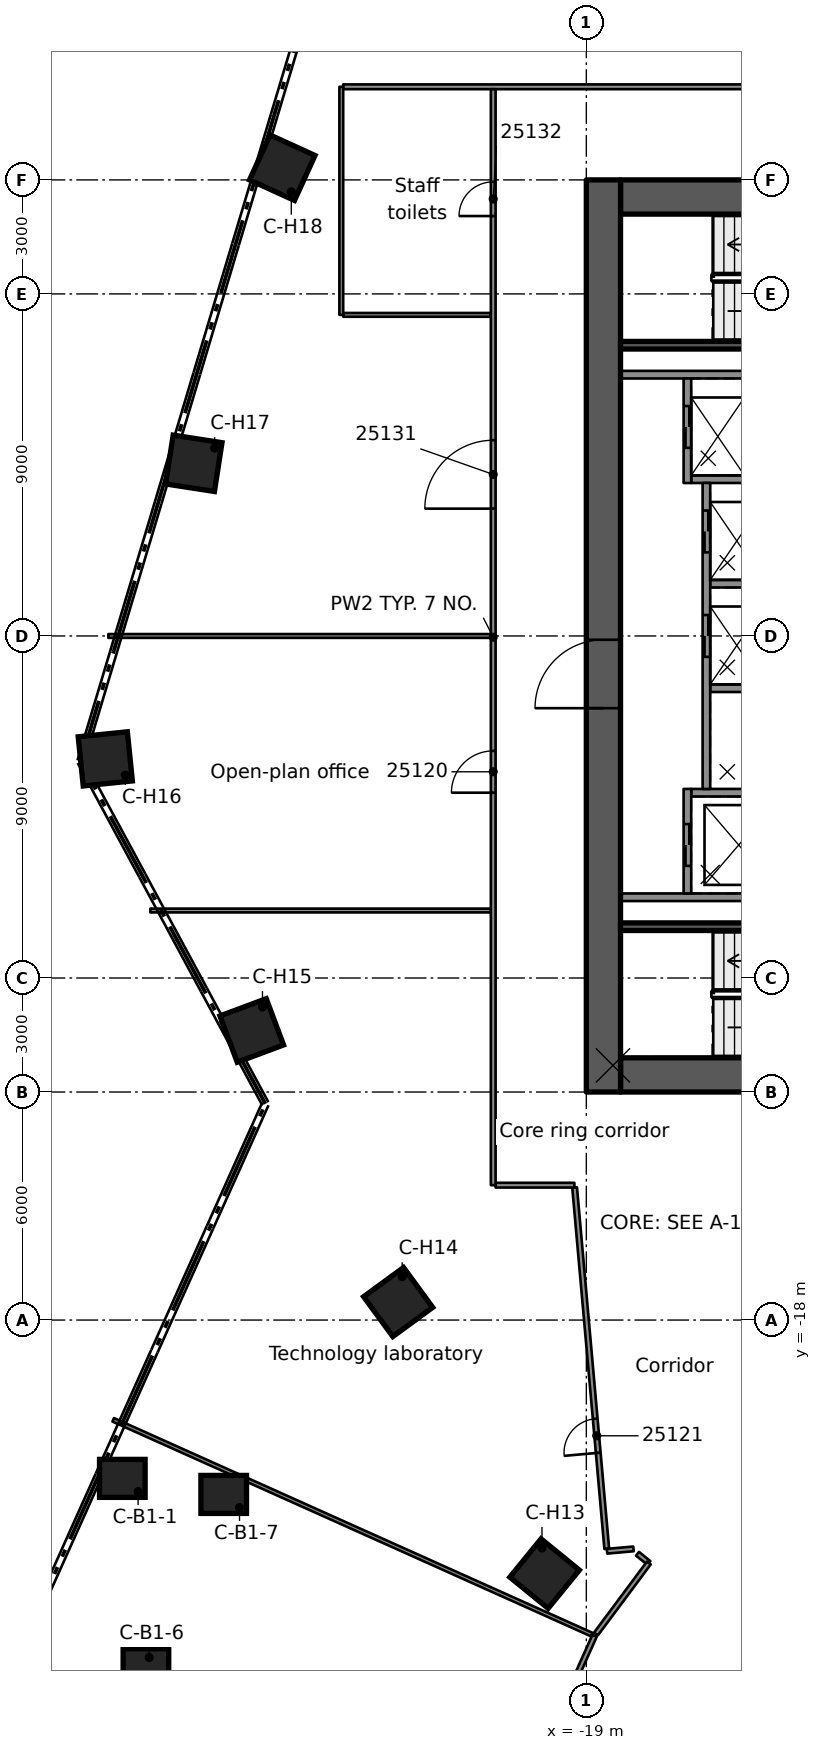
"""IFC4 building model, lengths in metres.
Left out: names, types, materials, properties, quantities, classifications, styles, units other than length and angle.
Written with IfcOpenShell. Run it as: python <this file> out.ifc"""

import sys

from ifc_helpers import new_model, si_unit, direction, frame, frame_2d, origin, origin_2d, place, context, subcontext, project, spatial, rectangle, extrude, element, fill, save


model = new_model("IFC4")
c1 = context("Model", 3, precision=1e-05, world=origin(), true_north=direction((0.0, 1.0)))
c2 = subcontext(c1, "Body", "Model", "MODEL_VIEW")
j1 = project(units=[si_unit("LENGTHUNIT", "METRE"), si_unit("PLANEANGLEUNIT", "RADIAN")], contexts=[c1])
p1 = place(None, origin())
s1 = spatial("IfcSite", under=j1, at=p1, CompositionType="ELEMENT")
p2 = place(p1, origin())
s2 = spatial("IfcBuilding", under=s1, at=p2, CompositionType="ELEMENT")
p3 = place(p2, frame((0.0, 0.0, 127.2)))
s3 = spatial("IfcBuildingStorey", under=s2, at=p3, CompositionType="ELEMENT", Elevation=127.2)
p4 = place(p3, frame((-18.1, 11.55, 0.0), z_axis=(0.0, 0.0, 1.0), x_axis=(1.0, 0.0, 0.0)))
e1 = element("IfcWall", 1, at=p4, inside=s3, PredefinedType="SHEAR", context=c2, shape_type="SweptSolid", body=[
    extrude(rectangle(XDim=9.2, YDim=0.9, at=frame_2d((4.6, 0.0))), origin(), (0.0, 0.0, 1.0), 3.5),
])
p5 = place(p4, frame((5.1, 0.0, 0.0)))
e2 = element("IfcOpeningElement", 2, at=p5, cuts=e1, PredefinedType="OPENING", context=c2, shape_type="SweptSolid", body=[
    extrude(rectangle(XDim=1.1, YDim=2.1, at=frame_2d((0.55, 1.05))), frame((0.0, 0.46, 0.0), z_axis=(0.0, -1.0, 0.0), x_axis=(1.0, 0.0, 0.0)), (0.0, 0.0, 1.0), 0.92),
])
p6 = place(p3, frame((-18.1, -11.55, 0.0), z_axis=(0.0, 0.0, 1.0), x_axis=(1.0, 0.0, 0.0)))
e3 = element("IfcWall", 3, at=p6, inside=s3, PredefinedType="SHEAR", context=c2, shape_type="SweptSolid", body=[
    extrude(rectangle(XDim=9.2, YDim=0.9, at=frame_2d((4.6, 0.0))), origin(), (0.0, 0.0, 1.0), 3.5),
])
p7 = place(p6, frame((5.1, 0.0, 0.0)))
e4 = element("IfcOpeningElement", 4, at=p7, cuts=e3, PredefinedType="OPENING", context=c2, shape_type="SweptSolid", body=[
    extrude(rectangle(XDim=1.1, YDim=2.1, at=frame_2d((0.55, 1.05))), frame((0.0, 0.46, 0.0), z_axis=(0.0, -1.0, 0.0), x_axis=(1.0, 0.0, 0.0)), (0.0, 0.0, 1.0), 0.92),
])
p8 = place(p6, frame((7.53, 0.0, 0.0)))
e5 = element("IfcOpeningElement", 5, at=p8, cuts=e3, PredefinedType="OPENING", context=c2, shape_type="SweptSolid", body=[
    extrude(rectangle(XDim=0.9, YDim=2.1, at=frame_2d((0.45, 1.05))), frame((0.0, 0.46, 0.0), z_axis=(0.0, -1.0, 0.0), x_axis=(1.0, 0.0, 0.0)), (0.0, 0.0, 1.0), 0.92),
])
p9 = place(p3, frame((-18.55, -12.0, 0.0), z_axis=(0.0, 0.0, 1.0), x_axis=(0.0, 1.0, 0.0)))
e6 = element("IfcWall", 6, at=p9, inside=s3, PredefinedType="SHEAR", context=c2, shape_type="SweptSolid", body=[
    extrude(rectangle(XDim=24.0, YDim=0.9, at=frame_2d((12.0, 0.0))), origin(), (0.0, 0.0, 1.0), 3.5),
])
p10 = place(p9, frame((10.1, 0.0, 0.0)))
e7 = element("IfcOpeningElement", 7, at=p10, cuts=e6, PredefinedType="OPENING", context=c2, shape_type="SweptSolid", body=[
    extrude(rectangle(XDim=1.8, YDim=2.1, at=frame_2d((0.9, 1.05))), frame((0.0, 0.46, 0.0), z_axis=(0.0, -1.0, 0.0), x_axis=(1.0, 0.0, 0.0)), (0.0, 0.0, 1.0), 0.92),
])
for number, where, z_axis, x_axis in (
    (8, (-31.21, -22.166, 0.0), (0.0, 0.0, 1.0), (1.0, 0.0, 0.0)),
    (9, (-30.589, -27.15, 0.0), (0.0, 0.0, 1.0), (1.0, 0.0, 0.0)),
    (10, (-28.542, -22.588, 0.0), (0.0, 0.0, 1.0), (1.0, 0.0, 0.0)),
):
    element("IfcColumn", number, at=place(p3, frame(where, z_axis=z_axis, x_axis=x_axis)), inside=s3, PredefinedType="COLUMN", context=c2, shape_type="SweptSolid", body=[
        extrude(rectangle(XDim=1.2, YDim=1.0, at=origin_2d()), origin(), (0.0, 0.0, 1.0), 3.5),
    ])
for number, where, z_axis, x_axis in (
    (11, (-20.098, -24.672, 0.0), (0.0, 0.0, 1.0), (-0.632, -0.775, 0.0)),
    (12, (-23.951, -17.526, 0.0), (0.0, 0.0, 1.0), (-0.807, -0.591, 0.0)),
    (13, (-27.804, -10.38, 0.0), (0.0, 0.0, 1.0), (-0.937, -0.35, 0.0)),
    (14, (-31.658, -3.234, 0.0), (0.0, 0.0, 1.0), (-0.995, -0.102, 0.0)),
    (15, (-29.329, 4.543, 0.0), (0.0, 0.0, 1.0), (-0.988, 0.153, 0.0)),
    (16, (-27.001, 12.321, 0.0), (0.0, 0.0, 1.0), (-0.91, 0.415, 0.0)),
):
    element("IfcColumn", number, at=place(p3, frame(where, z_axis=z_axis, x_axis=x_axis)), inside=s3, PredefinedType="COLUMN", context=c2, shape_type="SweptSolid", body=[
        extrude(rectangle(XDim=1.3, YDim=1.3, at=origin_2d()), origin(), (0.0, 0.0, 1.0), 3.5),
    ])
for number, where, z_axis, x_axis in (
    (17, (-11.54, 6.875, 0.0), (0.0, 0.0, 1.0), (-1.0, 0.0, 0.0)),
    (18, (-11.54, -6.875, 0.0), (0.0, 0.0, 1.0), (-1.0, 0.0, 0.0)),
):
    element("IfcWall", number, at=place(p3, frame(where, z_axis=z_axis, x_axis=x_axis)), inside=s3, PredefinedType="SOLIDWALL", context=c2, shape_type="SweptSolid", body=[
        extrude(rectangle(XDim=6.56, YDim=0.2, at=frame_2d((3.28, 0.0))), origin(), (0.0, 0.0, 1.0), 3.09),
    ])
p11 = place(p3, frame((-11.54, -4.125, 0.0), z_axis=(0.0, 0.0, 1.0), x_axis=(-1.0, 0.0, 0.0)))
e19 = element("IfcWall", 19, at=p11, inside=s3, PredefinedType="SOLIDWALL", context=c2, shape_type="SweptSolid", body=[
    extrude(rectangle(XDim=4.7, YDim=0.2, at=frame_2d((2.35, 0.0))), origin(), (0.0, 0.0, 1.0), 3.09),
])
for number, where, z_axis, x_axis in (
    (20, (-11.54, -1.375, 0.0), (0.0, 0.0, 1.0), (-1.0, 0.0, 0.0)),
    (21, (-11.54, 1.375, 0.0), (0.0, 0.0, 1.0), (-1.0, 0.0, 0.0)),
):
    element("IfcWall", number, at=place(p3, frame(where, z_axis=z_axis, x_axis=x_axis)), inside=s3, PredefinedType="SOLIDWALL", context=c2, shape_type="SweptSolid", body=[
        extrude(rectangle(XDim=4.2, YDim=0.2, at=frame_2d((2.1, 0.0))), origin(), (0.0, 0.0, 1.0), 3.09),
    ])
p12 = place(p3, frame((-11.54, 4.125, 0.0), z_axis=(0.0, 0.0, 1.0), x_axis=(-1.0, 0.0, 0.0)))
e22 = element("IfcWall", 22, at=p12, inside=s3, PredefinedType="SOLIDWALL", context=c2, shape_type="SweptSolid", body=[
    extrude(rectangle(XDim=4.7, YDim=0.2, at=frame_2d((2.35, 0.0))), origin(), (0.0, 0.0, 1.0), 3.09),
])
p13 = place(p3, frame((-16.34, -6.775, 0.0), z_axis=(0.0, 0.0, 1.0), x_axis=(0.0, 1.0, 0.0)))
e23 = element("IfcWall", 23, at=p13, inside=s3, PredefinedType="SOLIDWALL", context=c2, shape_type="SweptSolid", body=[
    extrude(rectangle(XDim=2.75, YDim=0.2, at=frame_2d((1.375, 0.0))), origin(), (0.0, 0.0, 1.0), 3.09),
])
p14 = place(p13, frame((0.725, 0.0, 0.0)))
e24 = element("IfcOpeningElement", 24, at=p14, cuts=e23, PredefinedType="OPENING", context=c2, shape_type="SweptSolid", body=[
    extrude(rectangle(XDim=1.1, YDim=2.1, at=frame_2d((0.55, 1.05))), frame((0.0, 0.11, 0.0), z_axis=(0.0, -1.0, 0.0), x_axis=(1.0, 0.0, 0.0)), (0.0, 0.0, 1.0), 0.22),
])
p15 = place(p3, frame((-15.84, -4.025, 0.0), z_axis=(0.0, 0.0, 1.0), x_axis=(0.0, 1.0, 0.0)))
e25 = element("IfcWall", 25, at=p15, inside=s3, PredefinedType="SOLIDWALL", context=c2, shape_type="SweptSolid", body=[
    extrude(rectangle(XDim=8.05, YDim=0.2, at=frame_2d((4.025, 0.0))), origin(), (0.0, 0.0, 1.0), 3.09),
])
p16 = place(p15, frame((3.475, 0.0, 0.0)))
e26 = element("IfcOpeningElement", 26, at=p16, cuts=e25, PredefinedType="OPENING", context=c2, shape_type="SweptSolid", body=[
    extrude(rectangle(XDim=1.1, YDim=2.1, at=frame_2d((0.55, 1.05))), frame((0.0, 0.11, 0.0), z_axis=(0.0, -1.0, 0.0), x_axis=(1.0, 0.0, 0.0)), (0.0, 0.0, 1.0), 0.22),
])
p17 = place(p15, frame((6.225, 0.0, 0.0)))
e27 = element("IfcOpeningElement", 27, at=p17, cuts=e25, PredefinedType="OPENING", context=c2, shape_type="SweptSolid", body=[
    extrude(rectangle(XDim=1.1, YDim=2.1, at=frame_2d((0.55, 1.05))), frame((0.0, 0.11, 0.0), z_axis=(0.0, -1.0, 0.0), x_axis=(1.0, 0.0, 0.0)), (0.0, 0.0, 1.0), 0.22),
])
p18 = place(p3, frame((-16.34, 4.025, 0.0), z_axis=(0.0, 0.0, 1.0), x_axis=(0.0, 1.0, 0.0)))
e28 = element("IfcWall", 28, at=p18, inside=s3, PredefinedType="SOLIDWALL", context=c2, shape_type="SweptSolid", body=[
    extrude(rectangle(XDim=2.75, YDim=0.2, at=frame_2d((1.375, 0.0))), origin(), (0.0, 0.0, 1.0), 3.09),
])
p19 = place(p18, frame((0.925, 0.0, 0.0)))
e29 = element("IfcOpeningElement", 29, at=p19, cuts=e28, PredefinedType="OPENING", context=c2, shape_type="SweptSolid", body=[
    extrude(rectangle(XDim=1.1, YDim=2.1, at=frame_2d((0.55, 1.05))), frame((0.0, 0.11, 0.0), z_axis=(0.0, -1.0, 0.0), x_axis=(1.0, 0.0, 0.0)), (0.0, 0.0, 1.0), 0.22),
])
for number, where, z_axis, x_axis in (
    (30, (-11.54, 7.65, 0.0), (0.0, 0.0, 1.0), (-1.0, 0.0, 0.0)),
    (31, (-11.54, -7.65, 0.0), (0.0, 0.0, 1.0), (-1.0, 0.0, 0.0)),
):
    element("IfcWall", number, at=place(p3, frame(where, z_axis=z_axis, x_axis=x_axis)), inside=s3, PredefinedType="SOLIDWALL", context=c2, shape_type="SweptSolid", body=[
        extrude(rectangle(XDim=6.56, YDim=0.2, at=frame_2d((3.28, 0.0))), origin(), (0.0, 0.0, 1.0), 3.09),
    ])
p20 = place(p3, frame((-18.462, -24.02, 0.0), z_axis=(0.0, 0.0, 1.0), x_axis=(-0.088655965606, 0.996062307169, 0.0)))
e32 = element("IfcWall", 32, at=p20, inside=s3, PredefinedType="PARTITIONING", context=c2, shape_type="SweptSolid", body=[
    extrude(rectangle(XDim=9.545, YDim=0.125, at=frame_2d((4.772, 0.0))), origin(), (0.0, 0.0, 1.0), 3.08),
])
p21 = place(p20, frame((2.536, 0.0, 0.0)))
e33 = element("IfcOpeningElement", 33, at=p21, cuts=e32, PredefinedType="OPENING", context=c2, shape_type="SweptSolid", body=[
    extrude(rectangle(XDim=0.9, YDim=2.1, at=frame_2d((0.45, 1.05))), frame((0.0, 0.073, 0.0), z_axis=(0.0, -1.0, 0.0), x_axis=(1.0, 0.0, 0.0)), (0.0, 0.0, 1.0), 0.145),
])
p22 = place(p3, frame((-17.653, -24.149, 0.0), z_axis=(0.0, 0.0, 1.0), x_axis=(0.774889561174, -0.632096644496, 0.0)))
e34 = element("IfcWall", 34, at=p22, inside=s3, PredefinedType="PARTITIONING", context=c2, shape_type="SweptSolid", body=[
    extrude(rectangle(XDim=0.385, YDim=0.125, at=frame_2d((0.192, 0.0))), origin(), (0.0, 0.0, 1.0), 3.08),
])
p23 = place(p3, frame((-31.45, -20.625, 0.0), z_axis=(0.0, 0.0, 1.0), x_axis=(0.91235405171, -0.409402105916, 0.0)))
e35 = element("IfcWall", 35, at=p23, inside=s3, PredefinedType="PARTITIONING", context=c2, shape_type="SweptSolid", body=[
    extrude(rectangle(XDim=13.808, YDim=0.1, at=frame_2d((6.904, 0.0))), origin(), (0.0, 0.0, 1.0), 3.08),
])
p24 = place(p3, frame((-21.387, -14.451, 0.0), z_axis=(0.0, 0.0, 1.0), x_axis=(1.0, 0.0, 0.0)))
e36 = element("IfcWall", 36, at=p24, inside=s3, PredefinedType="PARTITIONING", context=c2, shape_type="SweptSolid", body=[
    extrude(rectangle(XDim=2.073, YDim=0.125, at=frame_2d((1.037, 0.0))), origin(), (0.0, 0.0, 1.0), 3.08),
])
p25 = place(p3, frame((-30.472, -7.224, 0.0), z_axis=(0.0, 0.0, 1.0), x_axis=(1.0, 0.0, 0.0)))
e37 = element("IfcWall", 37, at=p25, inside=s3, PredefinedType="PARTITIONING", context=c2, shape_type="SweptSolid", body=[
    extrude(rectangle(XDim=8.96, YDim=0.1, at=frame_2d((4.48, 0.0))), origin(), (0.0, 0.0, 1.0), 3.08),
])
p26 = place(p3, frame((-31.577, 0.0, 0.0), z_axis=(0.0, 0.0, 1.0), x_axis=(1.0, 0.0, 0.0)))
e38 = element("IfcWall", 38, at=p26, inside=s3, PredefinedType="PARTITIONING", context=c2, shape_type="SweptSolid", body=[
    extrude(rectangle(XDim=10.065, YDim=0.1, at=frame_2d((5.032, 0.0))), origin(), (0.0, 0.0, 1.0), 3.08),
])
p27 = place(p3, frame((-25.398, 8.449, 0.0), z_axis=(0.0, 0.0, 1.0), x_axis=(1.0, 0.0, 0.0)))
e39 = element("IfcWall", 39, at=p27, inside=s3, PredefinedType="PARTITIONING", context=c2, shape_type="SweptSolid", body=[
    extrude(rectangle(XDim=3.886, YDim=0.1, at=frame_2d((1.943, 0.0))), origin(), (0.0, 0.0, 1.0), 3.08),
])
p28 = place(p3, frame((-25.398, 14.45, 0.0), z_axis=(0.0, 0.0, 1.0), x_axis=(1.0, 0.0, 0.0)))
e40 = element("IfcWall", 40, at=p28, inside=s3, PredefinedType="PARTITIONING", context=c2, shape_type="SweptSolid", body=[
    extrude(rectangle(XDim=15.007, YDim=0.125, at=frame_2d((7.503, 0.0))), origin(), (0.0, 0.0, 1.0), 3.08),
])
p29 = place(p3, frame((-18.455, -24.083, 0.0), z_axis=(0.0, 0.0, 1.0), x_axis=(0.996054818248, 0.088740064481, 0.0)))
e41 = element("IfcWall", 41, at=p29, inside=s3, PredefinedType="PARTITIONING", context=c2, shape_type="SweptSolid", body=[
    extrude(rectangle(XDim=0.699, YDim=0.125, at=frame_2d((0.349, 0.0))), origin(), (0.0, 0.0, 1.0), 3.08),
])
p30 = place(p3, frame((-17.355, -24.392, 0.0), z_axis=(0.0, 0.0, 1.0), x_axis=(-0.597497187646, -0.801871006306, 0.0)))
e42 = element("IfcWall", 42, at=p30, inside=s3, PredefinedType="PARTITIONING", context=c2, shape_type="SweptSolid", body=[
    extrude(rectangle(XDim=2.328, YDim=0.125, at=frame_2d((1.164, 0.0))), origin(), (0.0, 0.0, 1.0), 3.08),
])
p31 = place(p3, frame((-28.925, -48.949, 0.0), z_axis=(0.0, 0.0, 1.0), x_axis=(0.408793939156, 0.91262671192, 0.0)))
e43 = element("IfcWall", 43, at=p31, inside=s3, PredefinedType="PARTITIONING", context=c2, shape_type="SweptSolid", body=[
    extrude(rectangle(XDim=24.807, YDim=0.125, at=frame_2d((12.404, 0.0))), origin(), (0.0, 0.0, 1.0), 3.08),
])
p32 = place(p31, frame((10.351, 0.0, 0.0)))
e44 = element("IfcOpeningElement", 44, at=p32, cuts=e43, PredefinedType="OPENING", context=c2, shape_type="SweptSolid", body=[
    extrude(rectangle(XDim=0.9, YDim=2.1, at=frame_2d((0.45, 1.05))), frame((0.0, 0.073, 0.0), z_axis=(0.0, -1.0, 0.0), x_axis=(1.0, 0.0, 0.0)), (0.0, 0.0, 1.0), 0.145),
])
p33 = place(p31, frame((18.851, 0.0, 0.0)))
e45 = element("IfcOpeningElement", 45, at=p33, cuts=e43, PredefinedType="OPENING", context=c2, shape_type="SweptSolid", body=[
    extrude(rectangle(XDim=1.8, YDim=2.1, at=frame_2d((0.9, 1.05))), frame((0.0, 0.073, 0.0), z_axis=(0.0, -1.0, 0.0), x_axis=(1.0, 0.0, 0.0)), (0.0, 0.0, 1.0), 0.145),
])
p34 = place(p3, frame((-21.45, -14.451, 0.0), z_axis=(0.0, 0.0, 1.0), x_axis=(0.0, 1.0, 0.0)))
e46 = element("IfcWall", 46, at=p34, inside=s3, PredefinedType="PARTITIONING", context=c2, shape_type="SweptSolid", body=[
    extrude(rectangle(XDim=28.837, YDim=0.125, at=frame_2d((14.418, 0.0))), origin(), (0.0, 0.0, 1.0), 3.08),
])
p35 = place(p34, frame((10.327, 0.0, 0.0)))
e47 = element("IfcOpeningElement", 47, at=p35, cuts=e46, PredefinedType="OPENING", context=c2, shape_type="SweptSolid", body=[
    extrude(rectangle(XDim=1.1, YDim=2.1, at=frame_2d((0.55, 1.05))), frame((0.0, 0.073, 0.0), z_axis=(0.0, -1.0, 0.0), x_axis=(1.0, 0.0, 0.0)), (0.0, 0.0, 1.0), 0.145),
])
p36 = place(p34, frame((17.801, 0.0, 0.0)))
e48 = element("IfcOpeningElement", 48, at=p36, cuts=e46, PredefinedType="OPENING", context=c2, shape_type="SweptSolid", body=[
    extrude(rectangle(XDim=1.8, YDim=2.1, at=frame_2d((0.9, 1.05))), frame((0.0, 0.073, 0.0), z_axis=(0.0, -1.0, 0.0), x_axis=(1.0, 0.0, 0.0)), (0.0, 0.0, 1.0), 0.145),
])
p37 = place(p34, frame((25.5, 0.0, 0.0)))
e49 = element("IfcOpeningElement", 49, at=p37, cuts=e46, PredefinedType="OPENING", context=c2, shape_type="SweptSolid", body=[
    extrude(rectangle(XDim=0.9, YDim=2.1, at=frame_2d((0.45, 1.05))), frame((0.0, 0.073, 0.0), z_axis=(0.0, -1.0, 0.0), x_axis=(1.0, 0.0, 0.0)), (0.0, 0.0, 1.0), 0.145),
])
p38 = place(p3, frame((-25.448, 8.449, 0.0), z_axis=(0.0, 0.0, 1.0), x_axis=(0.0, 1.0, 0.0)))
e50 = element("IfcWall", 50, at=p38, inside=s3, PredefinedType="PARTITIONING", context=c2, shape_type="SweptSolid", body=[
    extrude(rectangle(XDim=6.001, YDim=0.1, at=frame_2d((3.0, 0.0))), origin(), (0.0, 0.0, 1.0), 3.08),
])
p39 = place(p14, origin())
e51 = element("IfcDoor", 51, at=p39, inside=s3, OperationType="DOUBLE_DOOR_SLIDING", PredefinedType="DOOR", context=c2, shape_type="SweptSolid", body=[
    extrude(rectangle(XDim=1.1, YDim=2.1, at=frame_2d((0.55, 1.05))), frame((0.0, 0.025, 0.0), z_axis=(0.0, -1.0, 0.0), x_axis=(1.0, 0.0, 0.0)), (0.0, 0.0, 1.0), 0.05),
])
fill(e24, e51)
p40 = place(p16, origin())
e52 = element("IfcDoor", 52, at=p40, inside=s3, OperationType="DOUBLE_DOOR_SLIDING", PredefinedType="DOOR", context=c2, shape_type="SweptSolid", body=[
    extrude(rectangle(XDim=1.1, YDim=2.1, at=frame_2d((0.55, 1.05))), frame((0.0, 0.025, 0.0), z_axis=(0.0, -1.0, 0.0), x_axis=(1.0, 0.0, 0.0)), (0.0, 0.0, 1.0), 0.05),
])
fill(e26, e52)
p41 = place(p17, origin())
e53 = element("IfcDoor", 53, at=p41, inside=s3, OperationType="DOUBLE_DOOR_SLIDING", PredefinedType="DOOR", context=c2, shape_type="SweptSolid", body=[
    extrude(rectangle(XDim=1.1, YDim=2.1, at=frame_2d((0.55, 1.05))), frame((0.0, 0.025, 0.0), z_axis=(0.0, -1.0, 0.0), x_axis=(1.0, 0.0, 0.0)), (0.0, 0.0, 1.0), 0.05),
])
fill(e27, e53)
p42 = place(p19, origin())
e54 = element("IfcDoor", 54, at=p42, inside=s3, OperationType="DOUBLE_DOOR_SLIDING", PredefinedType="DOOR", context=c2, shape_type="SweptSolid", body=[
    extrude(rectangle(XDim=1.1, YDim=2.1, at=frame_2d((0.55, 1.05))), frame((0.0, 0.025, 0.0), z_axis=(0.0, -1.0, 0.0), x_axis=(1.0, 0.0, 0.0)), (0.0, 0.0, 1.0), 0.05),
])
fill(e29, e54)
p43 = place(p10, origin())
e55 = element("IfcDoor", 55, at=p43, inside=s3, OperationType="SINGLE_SWING_LEFT", PredefinedType="DOOR", context=c2, shape_type="SweptSolid", body=[
    extrude(rectangle(XDim=1.8, YDim=2.1, at=frame_2d((0.9, 1.05))), frame((0.0, 0.025, 0.0), z_axis=(0.0, -1.0, 0.0), x_axis=(1.0, 0.0, 0.0)), (0.0, 0.0, 1.0), 0.05),
])
fill(e7, e55)
p44 = place(p35, origin())
e56 = element("IfcDoor", 56, at=p44, inside=s3, OperationType="SINGLE_SWING_LEFT", PredefinedType="DOOR", context=c2, shape_type="SweptSolid", body=[
    extrude(rectangle(XDim=1.1, YDim=2.1, at=frame_2d((0.55, 1.05))), frame((0.0, 0.025, 0.0), z_axis=(0.0, -1.0, 0.0), x_axis=(1.0, 0.0, 0.0)), (0.0, 0.0, 1.0), 0.05),
])
fill(e47, e56)
p45 = place(p21, origin())
e57 = element("IfcDoor", 57, at=p45, inside=s3, OperationType="SINGLE_SWING_LEFT", PredefinedType="DOOR", context=c2, shape_type="SweptSolid", body=[
    extrude(rectangle(XDim=0.9, YDim=2.1, at=frame_2d((0.45, 1.05))), frame((0.0, 0.025, 0.0), z_axis=(0.0, -1.0, 0.0), x_axis=(1.0, 0.0, 0.0)), (0.0, 0.0, 1.0), 0.05),
])
fill(e33, e57)
p46 = place(p36, origin())
e58 = element("IfcDoor", 58, at=p46, inside=s3, OperationType="DOUBLE_DOOR_SINGLE_SWING", PredefinedType="DOOR", context=c2, shape_type="SweptSolid", body=[
    extrude(rectangle(XDim=1.8, YDim=2.1, at=frame_2d((0.9, 1.05))), frame((0.0, 0.025, 0.0), z_axis=(0.0, -1.0, 0.0), x_axis=(1.0, 0.0, 0.0)), (0.0, 0.0, 1.0), 0.05),
])
fill(e48, e58)
p47 = place(p37, origin())
e59 = element("IfcDoor", 59, at=p47, inside=s3, OperationType="SINGLE_SWING_RIGHT", PredefinedType="DOOR", context=c2, shape_type="SweptSolid", body=[
    extrude(rectangle(XDim=0.9, YDim=2.1, at=frame_2d((0.45, 1.05))), frame((0.0, 0.025, 0.0), z_axis=(0.0, -1.0, 0.0), x_axis=(1.0, 0.0, 0.0)), (0.0, 0.0, 1.0), 0.05),
])
fill(e49, e59)
save(model, sys.argv[1])
